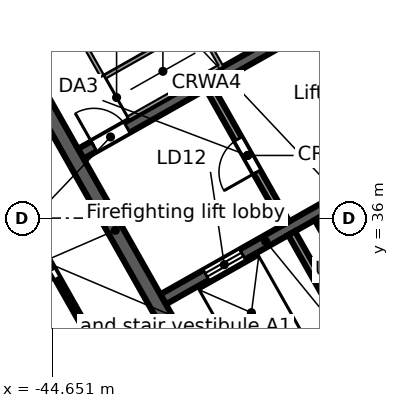
"""IFC4 building model, lengths in metres.
Left out: names, types, materials, properties, quantities, classifications, styles, units other than length and angle.
Written with IfcOpenShell. Run it as: python <this file> out.ifc"""

import sys

from ifc_helpers import new_model, si_unit, direction, frame, frame_2d, origin, place, context, subcontext, project, spatial, rectangle, extrude, element, fill, save


model = new_model("IFC4")
c1 = context("Model", 3, precision=1e-05, world=origin(), true_north=direction((0.0, 1.0)))
c2 = subcontext(c1, "Body", "Model", "MODEL_VIEW")
j1 = project(units=[si_unit("LENGTHUNIT", "METRE"), si_unit("PLANEANGLEUNIT", "RADIAN")], contexts=[c1])
p1 = place(None, origin())
s1 = spatial("IfcSite", under=j1, at=p1, CompositionType="ELEMENT")
p2 = place(p1, origin())
s2 = spatial("IfcBuilding", under=s1, at=p2, CompositionType="ELEMENT")
p3 = place(p2, frame((0.0, 0.0, 293.1)))
s3 = spatial("IfcBuildingStorey", under=s2, at=p3, CompositionType="ELEMENT", Elevation=293.1)
p4 = place(p3, frame((-58.732, 38.771, 0.0), z_axis=(0.0, 0.0, 1.0), x_axis=(0.870355615581, 0.492423702137, 0.0)))
e1 = element("IfcWall", 1, at=p4, inside=s3, PredefinedType="STANDARD", context=c2, shape_type="SweptSolid", body=[
    extrude(rectangle(XDim=64.052, YDim=0.25, at=frame_2d((32.026, 0.0))), origin(), (0.0, 0.0, 1.0), 3.52),
])
p5 = place(p4, frame((61.259, 0.0, 0.8)))
e2 = element("IfcOpeningElement", 2, at=p5, cuts=e1, PredefinedType="OPENING", context=c2, shape_type="SweptSolid", body=[
    extrude(rectangle(XDim=2.4, YDim=2.2, at=frame_2d((1.2, 1.1))), frame((0.0, 0.135, 0.0), z_axis=(0.0, -1.0, 0.0), x_axis=(1.0, 0.0, 0.0)), (0.0, 0.0, 1.0), 0.27),
])
p6 = place(p4, frame((58.216, 0.0, 0.8)))
e3 = element("IfcOpeningElement", 3, at=p6, cuts=e1, PredefinedType="OPENING", context=c2, shape_type="SweptSolid", body=[
    extrude(rectangle(XDim=2.4, YDim=2.2, at=frame_2d((1.2, 1.1))), frame((0.0, 0.135, 0.0), z_axis=(0.0, -1.0, 0.0), x_axis=(1.0, 0.0, 0.0)), (0.0, 0.0, 1.0), 0.27),
])
p7 = place(p4, frame((55.173, 0.0, 0.8)))
e4 = element("IfcOpeningElement", 4, at=p7, cuts=e1, PredefinedType="OPENING", context=c2, shape_type="SweptSolid", body=[
    extrude(rectangle(XDim=2.4, YDim=2.2, at=frame_2d((1.2, 1.1))), frame((0.0, 0.135, 0.0), z_axis=(0.0, -1.0, 0.0), x_axis=(1.0, 0.0, 0.0)), (0.0, 0.0, 1.0), 0.27),
])
p8 = place(p4, frame((52.129, 0.0, 0.8)))
e5 = element("IfcOpeningElement", 5, at=p8, cuts=e1, PredefinedType="OPENING", context=c2, shape_type="SweptSolid", body=[
    extrude(rectangle(XDim=2.4, YDim=2.2, at=frame_2d((1.2, 1.1))), frame((0.0, 0.135, 0.0), z_axis=(0.0, -1.0, 0.0), x_axis=(1.0, 0.0, 0.0)), (0.0, 0.0, 1.0), 0.27),
])
p9 = place(p4, frame((49.086, 0.0, 0.8)))
e6 = element("IfcOpeningElement", 6, at=p9, cuts=e1, PredefinedType="OPENING", context=c2, shape_type="SweptSolid", body=[
    extrude(rectangle(XDim=2.4, YDim=2.2, at=frame_2d((1.2, 1.1))), frame((0.0, 0.135, 0.0), z_axis=(0.0, -1.0, 0.0), x_axis=(1.0, 0.0, 0.0)), (0.0, 0.0, 1.0), 0.27),
])
p10 = place(p4, frame((46.043, 0.0, 0.8)))
e7 = element("IfcOpeningElement", 7, at=p10, cuts=e1, PredefinedType="OPENING", context=c2, shape_type="SweptSolid", body=[
    extrude(rectangle(XDim=2.4, YDim=2.2, at=frame_2d((1.2, 1.1))), frame((0.0, 0.135, 0.0), z_axis=(0.0, -1.0, 0.0), x_axis=(1.0, 0.0, 0.0)), (0.0, 0.0, 1.0), 0.27),
])
p11 = place(p4, frame((43.0, 0.0, 0.8)))
e8 = element("IfcOpeningElement", 8, at=p11, cuts=e1, PredefinedType="OPENING", context=c2, shape_type="SweptSolid", body=[
    extrude(rectangle(XDim=2.4, YDim=2.2, at=frame_2d((1.2, 1.1))), frame((0.0, 0.135, 0.0), z_axis=(0.0, -1.0, 0.0), x_axis=(1.0, 0.0, 0.0)), (0.0, 0.0, 1.0), 0.27),
])
p12 = place(p4, frame((39.956, 0.0, 0.8)))
e9 = element("IfcOpeningElement", 9, at=p12, cuts=e1, PredefinedType="OPENING", context=c2, shape_type="SweptSolid", body=[
    extrude(rectangle(XDim=2.4, YDim=2.2, at=frame_2d((1.2, 1.1))), frame((0.0, 0.135, 0.0), z_axis=(0.0, -1.0, 0.0), x_axis=(1.0, 0.0, 0.0)), (0.0, 0.0, 1.0), 0.27),
])
p13 = place(p4, frame((36.913, 0.0, 0.8)))
e10 = element("IfcOpeningElement", 10, at=p13, cuts=e1, PredefinedType="OPENING", context=c2, shape_type="SweptSolid", body=[
    extrude(rectangle(XDim=2.4, YDim=2.2, at=frame_2d((1.2, 1.1))), frame((0.0, 0.135, 0.0), z_axis=(0.0, -1.0, 0.0), x_axis=(1.0, 0.0, 0.0)), (0.0, 0.0, 1.0), 0.27),
])
p14 = place(p4, frame((33.87, 0.0, 0.8)))
e11 = element("IfcOpeningElement", 11, at=p14, cuts=e1, PredefinedType="OPENING", context=c2, shape_type="SweptSolid", body=[
    extrude(rectangle(XDim=2.4, YDim=2.2, at=frame_2d((1.2, 1.1))), frame((0.0, 0.135, 0.0), z_axis=(0.0, -1.0, 0.0), x_axis=(1.0, 0.0, 0.0)), (0.0, 0.0, 1.0), 0.27),
])
p15 = place(p4, frame((30.826, 0.0, 0.8)))
e12 = element("IfcOpeningElement", 12, at=p15, cuts=e1, PredefinedType="OPENING", context=c2, shape_type="SweptSolid", body=[
    extrude(rectangle(XDim=2.4, YDim=2.2, at=frame_2d((1.2, 1.1))), frame((0.0, 0.135, 0.0), z_axis=(0.0, -1.0, 0.0), x_axis=(1.0, 0.0, 0.0)), (0.0, 0.0, 1.0), 0.27),
])
p16 = place(p4, frame((27.783, 0.0, 0.8)))
e13 = element("IfcOpeningElement", 13, at=p16, cuts=e1, PredefinedType="OPENING", context=c2, shape_type="SweptSolid", body=[
    extrude(rectangle(XDim=2.4, YDim=2.2, at=frame_2d((1.2, 1.1))), frame((0.0, 0.135, 0.0), z_axis=(0.0, -1.0, 0.0), x_axis=(1.0, 0.0, 0.0)), (0.0, 0.0, 1.0), 0.27),
])
p17 = place(p4, frame((24.74, 0.0, 0.8)))
e14 = element("IfcOpeningElement", 14, at=p17, cuts=e1, PredefinedType="OPENING", context=c2, shape_type="SweptSolid", body=[
    extrude(rectangle(XDim=2.4, YDim=2.2, at=frame_2d((1.2, 1.1))), frame((0.0, 0.135, 0.0), z_axis=(0.0, -1.0, 0.0), x_axis=(1.0, 0.0, 0.0)), (0.0, 0.0, 1.0), 0.27),
])
p18 = place(p4, frame((21.696, 0.0, 0.8)))
e15 = element("IfcOpeningElement", 15, at=p18, cuts=e1, PredefinedType="OPENING", context=c2, shape_type="SweptSolid", body=[
    extrude(rectangle(XDim=2.4, YDim=2.2, at=frame_2d((1.2, 1.1))), frame((0.0, 0.135, 0.0), z_axis=(0.0, -1.0, 0.0), x_axis=(1.0, 0.0, 0.0)), (0.0, 0.0, 1.0), 0.27),
])
p19 = place(p4, frame((18.653, 0.0, 0.8)))
e16 = element("IfcOpeningElement", 16, at=p19, cuts=e1, PredefinedType="OPENING", context=c2, shape_type="SweptSolid", body=[
    extrude(rectangle(XDim=2.4, YDim=2.2, at=frame_2d((1.2, 1.1))), frame((0.0, 0.135, 0.0), z_axis=(0.0, -1.0, 0.0), x_axis=(1.0, 0.0, 0.0)), (0.0, 0.0, 1.0), 0.27),
])
p20 = place(p4, frame((15.61, 0.0, 0.8)))
e17 = element("IfcOpeningElement", 17, at=p20, cuts=e1, PredefinedType="OPENING", context=c2, shape_type="SweptSolid", body=[
    extrude(rectangle(XDim=2.4, YDim=2.2, at=frame_2d((1.2, 1.1))), frame((0.0, 0.135, 0.0), z_axis=(0.0, -1.0, 0.0), x_axis=(1.0, 0.0, 0.0)), (0.0, 0.0, 1.0), 0.27),
])
p21 = place(p4, frame((12.567, 0.0, 0.8)))
e18 = element("IfcOpeningElement", 18, at=p21, cuts=e1, PredefinedType="OPENING", context=c2, shape_type="SweptSolid", body=[
    extrude(rectangle(XDim=2.4, YDim=2.2, at=frame_2d((1.2, 1.1))), frame((0.0, 0.135, 0.0), z_axis=(0.0, -1.0, 0.0), x_axis=(1.0, 0.0, 0.0)), (0.0, 0.0, 1.0), 0.27),
])
p22 = place(p4, frame((9.523, 0.0, 0.8)))
e19 = element("IfcOpeningElement", 19, at=p22, cuts=e1, PredefinedType="OPENING", context=c2, shape_type="SweptSolid", body=[
    extrude(rectangle(XDim=2.4, YDim=2.2, at=frame_2d((1.2, 1.1))), frame((0.0, 0.135, 0.0), z_axis=(0.0, -1.0, 0.0), x_axis=(1.0, 0.0, 0.0)), (0.0, 0.0, 1.0), 0.27),
])
p23 = place(p4, frame((6.48, 0.0, 0.8)))
e20 = element("IfcOpeningElement", 20, at=p23, cuts=e1, PredefinedType="OPENING", context=c2, shape_type="SweptSolid", body=[
    extrude(rectangle(XDim=2.4, YDim=2.2, at=frame_2d((1.2, 1.1))), frame((0.0, 0.135, 0.0), z_axis=(0.0, -1.0, 0.0), x_axis=(1.0, 0.0, 0.0)), (0.0, 0.0, 1.0), 0.27),
])
p24 = place(p4, frame((3.437, 0.0, 0.8)))
e21 = element("IfcOpeningElement", 21, at=p24, cuts=e1, PredefinedType="OPENING", context=c2, shape_type="SweptSolid", body=[
    extrude(rectangle(XDim=2.4, YDim=2.2, at=frame_2d((1.2, 1.1))), frame((0.0, 0.135, 0.0), z_axis=(0.0, -1.0, 0.0), x_axis=(1.0, 0.0, 0.0)), (0.0, 0.0, 1.0), 0.27),
])
p25 = place(p4, frame((0.393, 0.0, 0.8)))
e22 = element("IfcOpeningElement", 22, at=p25, cuts=e1, PredefinedType="OPENING", context=c2, shape_type="SweptSolid", body=[
    extrude(rectangle(XDim=2.4, YDim=2.2, at=frame_2d((1.2, 1.1))), frame((0.0, 0.135, 0.0), z_axis=(0.0, -1.0, 0.0), x_axis=(1.0, 0.0, 0.0)), (0.0, 0.0, 1.0), 0.27),
])
p26 = place(p3, frame((-44.115, 26.507, 0.0), z_axis=(0.0, 0.0, 1.0), x_axis=(-0.857166583633, 0.515039268311, 0.0)))
e23 = element("IfcWall", 23, at=p26, inside=s3, PredefinedType="STANDARD", context=c2, shape_type="SweptSolid", body=[
    extrude(rectangle(XDim=17.106, YDim=0.25, at=frame_2d((8.553, 0.0))), origin(), (0.0, 0.0, 1.0), 3.52),
])
p27 = place(p26, frame((14.417, 0.0, 0.8)))
e24 = element("IfcOpeningElement", 24, at=p27, cuts=e23, PredefinedType="OPENING", context=c2, shape_type="SweptSolid", body=[
    extrude(rectangle(XDim=2.4, YDim=2.2, at=frame_2d((1.2, 1.1))), frame((0.0, 0.135, 0.0), z_axis=(0.0, -1.0, 0.0), x_axis=(1.0, 0.0, 0.0)), (0.0, 0.0, 1.0), 0.27),
])
p28 = place(p26, frame((11.584, 0.0, 0.8)))
e25 = element("IfcOpeningElement", 25, at=p28, cuts=e23, PredefinedType="OPENING", context=c2, shape_type="SweptSolid", body=[
    extrude(rectangle(XDim=2.4, YDim=2.2, at=frame_2d((1.2, 1.1))), frame((0.0, 0.135, 0.0), z_axis=(0.0, -1.0, 0.0), x_axis=(1.0, 0.0, 0.0)), (0.0, 0.0, 1.0), 0.27),
])
p29 = place(p26, frame((8.75, 0.0, 0.8)))
e26 = element("IfcOpeningElement", 26, at=p29, cuts=e23, PredefinedType="OPENING", context=c2, shape_type="SweptSolid", body=[
    extrude(rectangle(XDim=2.4, YDim=2.2, at=frame_2d((1.2, 1.1))), frame((0.0, 0.135, 0.0), z_axis=(0.0, -1.0, 0.0), x_axis=(1.0, 0.0, 0.0)), (0.0, 0.0, 1.0), 0.27),
])
p30 = place(p26, frame((5.917, 0.0, 0.8)))
e27 = element("IfcOpeningElement", 27, at=p30, cuts=e23, PredefinedType="OPENING", context=c2, shape_type="SweptSolid", body=[
    extrude(rectangle(XDim=2.4, YDim=2.2, at=frame_2d((1.2, 1.1))), frame((0.0, 0.135, 0.0), z_axis=(0.0, -1.0, 0.0), x_axis=(1.0, 0.0, 0.0)), (0.0, 0.0, 1.0), 0.27),
])
p31 = place(p26, frame((3.084, 0.0, 0.8)))
e28 = element("IfcOpeningElement", 28, at=p31, cuts=e23, PredefinedType="OPENING", context=c2, shape_type="SweptSolid", body=[
    extrude(rectangle(XDim=2.4, YDim=2.2, at=frame_2d((1.2, 1.1))), frame((0.0, 0.135, 0.0), z_axis=(0.0, -1.0, 0.0), x_axis=(1.0, 0.0, 0.0)), (0.0, 0.0, 1.0), 0.27),
])
p32 = place(p26, frame((0.25, 0.0, 0.8)))
e29 = element("IfcOpeningElement", 29, at=p32, cuts=e23, PredefinedType="OPENING", context=c2, shape_type="SweptSolid", body=[
    extrude(rectangle(XDim=2.4, YDim=2.2, at=frame_2d((1.2, 1.1))), frame((0.0, 0.135, 0.0), z_axis=(0.0, -1.0, 0.0), x_axis=(1.0, 0.0, 0.0)), (0.0, 0.0, 1.0), 0.27),
])
p33 = place(p3, frame((-3.017, 46.293, 0.0), z_axis=(0.0, 0.0, 1.0), x_axis=(-0.870355474887, -0.492423950812, 0.0)))
e30 = element("IfcWall", 30, at=p33, inside=s3, PredefinedType="STANDARD", context=c2, shape_type="SweptSolid", body=[
    extrude(rectangle(XDim=40.34, YDim=0.25, at=frame_2d((20.17, 0.0))), origin(), (0.0, 0.0, 1.0), 3.52),
])
p34 = place(p33, frame((37.428, 0.0, 0.8)))
e31 = element("IfcOpeningElement", 31, at=p34, cuts=e30, PredefinedType="OPENING", context=c2, shape_type="SweptSolid", body=[
    extrude(rectangle(XDim=2.4, YDim=2.2, at=frame_2d((1.2, 1.1))), frame((0.0, 0.135, 0.0), z_axis=(0.0, -1.0, 0.0), x_axis=(1.0, 0.0, 0.0)), (0.0, 0.0, 1.0), 0.27),
])
p35 = place(p33, frame((34.372, 0.0, 0.0)))
e32 = element("IfcOpeningElement", 32, at=p35, cuts=e30, PredefinedType="OPENING", context=c2, shape_type="SweptSolid", body=[
    extrude(rectangle(XDim=1.8, YDim=2.4, at=frame_2d((0.9, 1.2))), frame((0.0, 0.135, 0.0), z_axis=(0.0, -1.0, 0.0), x_axis=(1.0, 0.0, 0.0)), (0.0, 0.0, 1.0), 0.27),
])
p36 = place(p33, frame((30.716, 0.0, 0.8)))
e33 = element("IfcOpeningElement", 33, at=p36, cuts=e30, PredefinedType="OPENING", context=c2, shape_type="SweptSolid", body=[
    extrude(rectangle(XDim=2.4, YDim=2.2, at=frame_2d((1.2, 1.1))), frame((0.0, 0.135, 0.0), z_axis=(0.0, -1.0, 0.0), x_axis=(1.0, 0.0, 0.0)), (0.0, 0.0, 1.0), 0.27),
])
p37 = place(p33, frame((27.36, 0.0, 0.8)))
e34 = element("IfcOpeningElement", 34, at=p37, cuts=e30, PredefinedType="OPENING", context=c2, shape_type="SweptSolid", body=[
    extrude(rectangle(XDim=2.4, YDim=2.2, at=frame_2d((1.2, 1.1))), frame((0.0, 0.135, 0.0), z_axis=(0.0, -1.0, 0.0), x_axis=(1.0, 0.0, 0.0)), (0.0, 0.0, 1.0), 0.27),
])
p38 = place(p33, frame((24.304, 0.0, 0.0)))
e35 = element("IfcOpeningElement", 35, at=p38, cuts=e30, PredefinedType="OPENING", context=c2, shape_type="SweptSolid", body=[
    extrude(rectangle(XDim=1.8, YDim=2.4, at=frame_2d((0.9, 1.2))), frame((0.0, 0.135, 0.0), z_axis=(0.0, -1.0, 0.0), x_axis=(1.0, 0.0, 0.0)), (0.0, 0.0, 1.0), 0.27),
])
p39 = place(p33, frame((20.648, 0.0, 0.8)))
e36 = element("IfcOpeningElement", 36, at=p39, cuts=e30, PredefinedType="OPENING", context=c2, shape_type="SweptSolid", body=[
    extrude(rectangle(XDim=2.4, YDim=2.2, at=frame_2d((1.2, 1.1))), frame((0.0, 0.135, 0.0), z_axis=(0.0, -1.0, 0.0), x_axis=(1.0, 0.0, 0.0)), (0.0, 0.0, 1.0), 0.27),
])
p40 = place(p33, frame((17.292, 0.0, 0.8)))
e37 = element("IfcOpeningElement", 37, at=p40, cuts=e30, PredefinedType="OPENING", context=c2, shape_type="SweptSolid", body=[
    extrude(rectangle(XDim=2.4, YDim=2.2, at=frame_2d((1.2, 1.1))), frame((0.0, 0.135, 0.0), z_axis=(0.0, -1.0, 0.0), x_axis=(1.0, 0.0, 0.0)), (0.0, 0.0, 1.0), 0.27),
])
p41 = place(p33, frame((14.236, 0.0, 0.0)))
e38 = element("IfcOpeningElement", 38, at=p41, cuts=e30, PredefinedType="OPENING", context=c2, shape_type="SweptSolid", body=[
    extrude(rectangle(XDim=1.8, YDim=2.4, at=frame_2d((0.9, 1.2))), frame((0.0, 0.135, 0.0), z_axis=(0.0, -1.0, 0.0), x_axis=(1.0, 0.0, 0.0)), (0.0, 0.0, 1.0), 0.27),
])
p42 = place(p33, frame((10.58, 0.0, 0.8)))
e39 = element("IfcOpeningElement", 39, at=p42, cuts=e30, PredefinedType="OPENING", context=c2, shape_type="SweptSolid", body=[
    extrude(rectangle(XDim=2.4, YDim=2.2, at=frame_2d((1.2, 1.1))), frame((0.0, 0.135, 0.0), z_axis=(0.0, -1.0, 0.0), x_axis=(1.0, 0.0, 0.0)), (0.0, 0.0, 1.0), 0.27),
])
p43 = place(p33, frame((7.224, 0.0, 0.8)))
e40 = element("IfcOpeningElement", 40, at=p43, cuts=e30, PredefinedType="OPENING", context=c2, shape_type="SweptSolid", body=[
    extrude(rectangle(XDim=2.4, YDim=2.2, at=frame_2d((1.2, 1.1))), frame((0.0, 0.135, 0.0), z_axis=(0.0, -1.0, 0.0), x_axis=(1.0, 0.0, 0.0)), (0.0, 0.0, 1.0), 0.27),
])
p44 = place(p33, frame((4.168, 0.0, 0.0)))
e41 = element("IfcOpeningElement", 41, at=p44, cuts=e30, PredefinedType="OPENING", context=c2, shape_type="SweptSolid", body=[
    extrude(rectangle(XDim=1.8, YDim=2.4, at=frame_2d((0.9, 1.2))), frame((0.0, 0.135, 0.0), z_axis=(0.0, -1.0, 0.0), x_axis=(1.0, 0.0, 0.0)), (0.0, 0.0, 1.0), 0.27),
])
p45 = place(p33, frame((0.512, 0.0, 0.8)))
e42 = element("IfcOpeningElement", 42, at=p45, cuts=e30, PredefinedType="OPENING", context=c2, shape_type="SweptSolid", body=[
    extrude(rectangle(XDim=2.4, YDim=2.2, at=frame_2d((1.2, 1.1))), frame((0.0, 0.135, 0.0), z_axis=(0.0, -1.0, 0.0), x_axis=(1.0, 0.0, 0.0)), (0.0, 0.0, 1.0), 0.27),
])
p46 = place(p3, frame((-39.813, 29.662, 0.0), z_axis=(0.0, 0.0, 1.0), x_axis=(0.870350116061, 0.492433422375, 0.0)))
e43 = element("IfcWall", 43, at=p46, inside=s3, PredefinedType="SOLIDWALL", context=c2, shape_type="SweptSolid", body=[
    extrude(rectangle(XDim=17.0, YDim=0.4, at=frame_2d((8.5, 0.0))), origin(), (0.0, 0.0, 1.0), 3.52),
])
p47 = place(p46, frame((7.2, 0.0, 0.0)))
e44 = element("IfcOpeningElement", 44, at=p47, cuts=e43, PredefinedType="OPENING", context=c2, shape_type="SweptSolid", body=[
    extrude(rectangle(XDim=1.2, YDim=2.1, at=frame_2d((0.6, 1.05))), frame((0.0, 0.21, 0.0), z_axis=(0.0, -1.0, 0.0), x_axis=(1.0, 0.0, 0.0)), (0.0, 0.0, 1.0), 0.42),
])
p48 = place(p3, frame((-41.73, 33.863, 0.0), z_axis=(0.0, 0.0, 1.0), x_axis=(0.870350800578, 0.492432212525, 0.0)))
e45 = element("IfcWall", 45, at=p48, inside=s3, PredefinedType="SOLIDWALL", context=c2, shape_type="SweptSolid", body=[
    extrude(rectangle(XDim=6.2, YDim=0.3, at=frame_2d((3.1, 0.0))), origin(), (0.0, 0.0, 1.0), 3.52),
])
p49 = place(p48, frame((1.3, 0.0, 0.0)))
e46 = element("IfcOpeningElement", 46, at=p49, cuts=e45, PredefinedType="OPENING", context=c2, shape_type="SweptSolid", body=[
    extrude(rectangle(XDim=1.1, YDim=2.1, at=frame_2d((0.55, 1.05))), frame((0.0, 0.16, 0.0), z_axis=(0.0, -1.0, 0.0), x_axis=(1.0, 0.0, 0.0)), (0.0, 0.0, 1.0), 0.32),
])
p50 = place(p48, frame((4.95, 0.0, 0.0)))
e47 = element("IfcOpeningElement", 47, at=p50, cuts=e45, PredefinedType="OPENING", context=c2, shape_type="SweptSolid", body=[
    extrude(rectangle(XDim=0.9, YDim=2.1, at=frame_2d((0.45, 1.05))), frame((0.0, 0.16, 0.0), z_axis=(0.0, -1.0, 0.0), x_axis=(1.0, 0.0, 0.0)), (0.0, 0.0, 1.0), 0.32),
])
p51 = place(p3, frame((-43.897, 37.692, 0.0), z_axis=(0.0, 0.0, 1.0), x_axis=(0.870356351998, 0.492422400523, 0.0)))
e48 = element("IfcWall", 48, at=p51, inside=s3, PredefinedType="SOLIDWALL", context=c2, shape_type="SweptSolid", body=[
    extrude(rectangle(XDim=7.6, YDim=0.3, at=frame_2d((3.8, 0.0))), origin(), (0.0, 0.0, 1.0), 3.52),
])
p52 = place(p51, frame((0.4, 0.0, 0.0)))
e49 = element("IfcOpeningElement", 49, at=p52, cuts=e48, PredefinedType="OPENING", context=c2, shape_type="SweptSolid", body=[
    extrude(rectangle(XDim=1.0, YDim=2.1, at=frame_2d((0.5, 1.05))), frame((0.0, 0.16, 0.0), z_axis=(0.0, -1.0, 0.0), x_axis=(1.0, 0.0, 0.0)), (0.0, 0.0, 1.0), 0.32),
])
p53 = place(p3, frame((-46.238, 41.423, 0.0), z_axis=(0.0, 0.0, 1.0), x_axis=(0.492421663121, -0.870356769198, 0.0)))
e50 = element("IfcWall", 50, at=p53, inside=s3, PredefinedType="SOLIDWALL", context=c2, shape_type="SweptSolid", body=[
    extrude(rectangle(XDim=13.2, YDim=0.4, at=frame_2d((6.6, 0.0))), origin(), (0.0, 0.0, 1.0), 3.52),
])
p54 = place(p3, frame((-38.349, 35.603, 0.0), z_axis=(0.0, 0.0, 1.0), x_axis=(0.492397924348, -0.870370199454, 0.0)))
e51 = element("IfcWall", 51, at=p54, inside=s3, PredefinedType="SOLIDWALL", context=c2, shape_type="SweptSolid", body=[
    extrude(rectangle(XDim=4.25, YDim=0.2, at=frame_2d((2.125, 0.0))), origin(), (0.0, 0.0, 1.0), 3.52),
])
p55 = place(p3, frame((-40.516, 39.433, 0.0), z_axis=(0.0, 0.0, 1.0), x_axis=(0.492453559952, -0.87033872216, 0.0)))
e52 = element("IfcWall", 52, at=p55, inside=s3, PredefinedType="PARTITIONING", context=c2, shape_type="SweptSolid", body=[
    extrude(rectangle(XDim=4.1, YDim=0.2, at=frame_2d((2.05, 0.0))), origin(), (0.0, 0.0, 1.0), 3.52),
])
p56 = place(p55, frame((1.55, 0.0, 0.0)))
e53 = element("IfcOpeningElement", 53, at=p56, cuts=e52, PredefinedType="OPENING", context=c2, shape_type="SweptSolid", body=[
    extrude(rectangle(XDim=1.0, YDim=2.1, at=frame_2d((0.5, 1.05))), frame((0.0, 0.11, 0.0), z_axis=(0.0, -1.0, 0.0), x_axis=(1.0, 0.0, 0.0)), (0.0, 0.0, 1.0), 0.22),
])
p57 = place(p3, frame((-37.653, 35.997, 0.0), z_axis=(0.0, 0.0, 1.0), x_axis=(0.492422543467, -0.870356271124, 0.0)))
e54 = element("IfcWall", 54, at=p57, inside=s3, PredefinedType="SOLIDWALL", context=c2, shape_type="SweptSolid", body=[
    extrude(rectangle(XDim=4.25, YDim=0.2, at=frame_2d((2.125, 0.0))), origin(), (0.0, 0.0, 1.0), 3.52),
])
p58 = place(p3, frame((-45.916, 36.895, 0.0), z_axis=(0.0, 0.0, 1.0), x_axis=(0.492369352746, -0.870386362759, 0.0)))
e55 = element("IfcWall", 55, at=p58, inside=s3, PredefinedType="PARTITIONING", context=c2, shape_type="SweptSolid", body=[
    extrude(rectangle(XDim=5.0, YDim=0.125, at=frame_2d((2.5, 0.0))), origin(), (0.0, 0.0, 1.0), 2.8),
])
p59 = place(p58, frame((1.95, 0.0, 0.0)))
e56 = element("IfcOpeningElement", 56, at=p59, cuts=e55, PredefinedType="OPENING", context=c2, shape_type="SweptSolid", body=[
    extrude(rectangle(XDim=0.9, YDim=2.1, at=frame_2d((0.45, 1.05))), frame((0.0, 0.073, 0.0), z_axis=(0.0, -1.0, 0.0), x_axis=(1.0, 0.0, 0.0)), (0.0, 0.0, 1.0), 0.145),
])
p60 = place(p49, origin())
e57 = element("IfcDoor", 57, at=p60, inside=s3, OperationType="DOUBLE_DOOR_SLIDING", PredefinedType="DOOR", context=c2, shape_type="SweptSolid", body=[
    extrude(rectangle(XDim=1.1, YDim=2.1, at=frame_2d((0.55, 1.05))), frame((0.0, 0.025, 0.0), z_axis=(0.0, -1.0, 0.0), x_axis=(1.0, 0.0, 0.0)), (0.0, 0.0, 1.0), 0.05),
])
fill(e46, e57)
p61 = place(p52, origin())
e58 = element("IfcDoor", 58, at=p61, inside=s3, OperationType="SINGLE_SWING_LEFT", PredefinedType="DOOR", context=c2, shape_type="SweptSolid", body=[
    extrude(rectangle(XDim=1.0, YDim=2.1, at=frame_2d((0.5, 1.05))), frame((0.0, 0.025, 0.0), z_axis=(0.0, -1.0, 0.0), x_axis=(1.0, 0.0, 0.0)), (0.0, 0.0, 1.0), 0.05),
])
fill(e49, e58)
p62 = place(p56, frame((1.0, 0.0, 0.0), z_axis=(0.0, 0.0, 1.0), x_axis=(-1.0, 0.0, 0.0)))
e59 = element("IfcDoor", 59, at=p62, inside=s3, OperationType="SINGLE_SWING_LEFT", PredefinedType="DOOR", context=c2, shape_type="SweptSolid", body=[
    extrude(rectangle(XDim=1.0, YDim=2.1, at=frame_2d((0.5, 1.05))), frame((0.0, 0.025, 0.0), z_axis=(0.0, -1.0, 0.0), x_axis=(1.0, 0.0, 0.0)), (0.0, 0.0, 1.0), 0.05),
])
fill(e53, e59)
p63 = place(p59, frame((0.9, 0.0, 0.0), z_axis=(0.0, 0.0, 1.0), x_axis=(-1.0, 0.0, 0.0)))
e60 = element("IfcDoor", 60, at=p63, inside=s3, OperationType="SINGLE_SWING_RIGHT", PredefinedType="DOOR", context=c2, shape_type="SweptSolid", body=[
    extrude(rectangle(XDim=0.9, YDim=2.1, at=frame_2d((0.45, 1.05))), frame((0.0, 0.025, 0.0), z_axis=(0.0, -1.0, 0.0), x_axis=(1.0, 0.0, 0.0)), (0.0, 0.0, 1.0), 0.05),
])
fill(e56, e60)
save(model, sys.argv[1])
